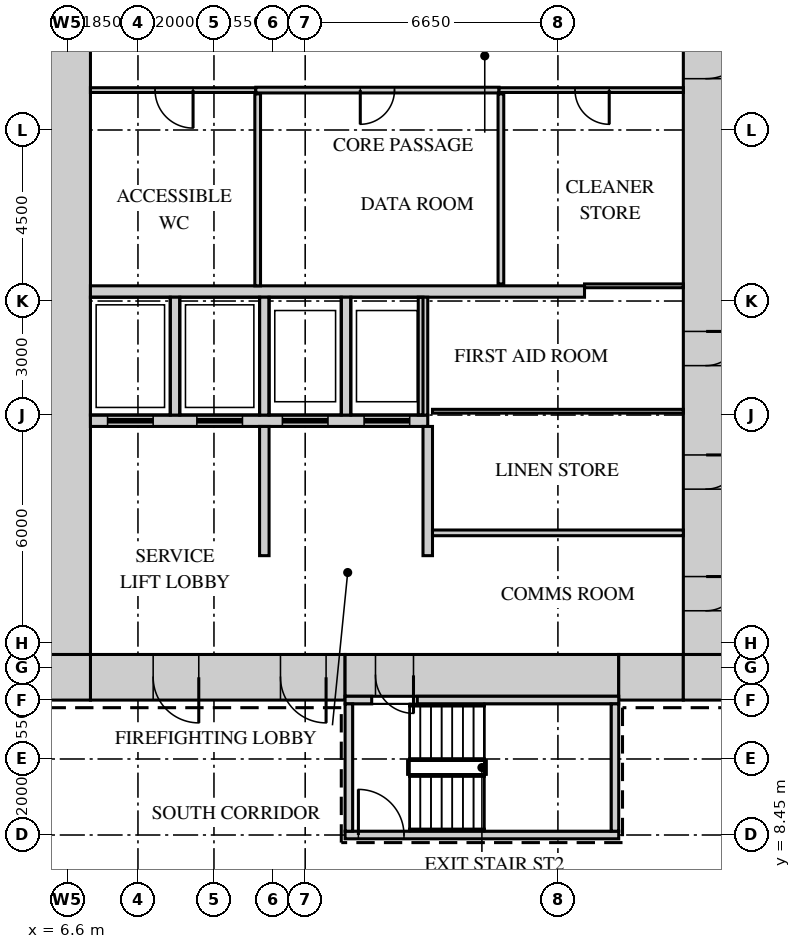
"""IFC4 building model, lengths in metres.
Left out: names, types, materials, properties, quantities, classifications, styles, units other than length and angle.
Written with IfcOpenShell. Run it as: python <this file> out.ifc"""

import sys

from ifc_helpers import new_model, si_unit, direction, frame, frame_2d, origin, place, context, subcontext, project, spatial, rectangle, extrude, source, transform, mapped, element, fill, save


model = new_model("IFC4")
c1 = context("Model", 3, precision=1e-05, world=origin(), true_north=direction((0.0, 1.0)))
c2 = subcontext(c1, "Body", "Model", "MODEL_VIEW")
j1 = project(units=[si_unit("LENGTHUNIT", "METRE"), si_unit("PLANEANGLEUNIT", "RADIAN")], contexts=[c1])
p1 = place(None, origin())
s1 = spatial("IfcSite", under=j1, at=p1, CompositionType="ELEMENT")
p2 = place(p1, origin())
s2 = spatial("IfcBuilding", under=s1, at=p2, CompositionType="ELEMENT")
p3 = place(p2, frame((0.0, 0.0, 7.5)))
s3 = spatial("IfcBuildingStorey", under=s2, at=p3, CompositionType="ELEMENT", Elevation=7.5)
m1 = source(origin(), c2, "Body", "SweptSolid", [
    extrude(rectangle(XDim=6.7, YDim=1.2, at=frame_2d((3.35, 0.0))), origin(), (0.0, 0.0, 1.0), 5.2),
])
p4 = place(p3, frame((7.2, 12.6, 0.0), z_axis=(0.0, 0.0, 1.0), x_axis=(1.0, 0.0, 0.0)))
e1 = element("IfcWall", 1, at=p4, inside=s3, PredefinedType="SHEAR", context=c2, shape_type="MappedRepresentation", body=[
    mapped(m1, transform((0.0, 0.0, 0.0))),
])
m2 = source(origin(), c2, "Body", "SweptSolid", [
    extrude(rectangle(XDim=1.2, YDim=2.1, at=frame_2d((0.6, 1.05))), frame((0.0, 0.61, 0.0), z_axis=(0.0, -1.0, 0.0), x_axis=(1.0, 0.0, 0.0)), (0.0, 0.0, 1.0), 1.22),
])
p5 = place(p4, frame((5.0, 0.0, 0.0)))
e2 = element("IfcOpeningElement", 2, at=p5, cuts=e1, PredefinedType="OPENING", context=c2, shape_type="MappedRepresentation", body=[
    mapped(m2, transform((0.0, 0.0, 0.0))),
])
p6 = place(p4, frame((1.65, 0.0, 0.0)))
e3 = element("IfcOpeningElement", 3, at=p6, cuts=e1, PredefinedType="OPENING", context=c2, shape_type="MappedRepresentation", body=[
    mapped(m2, transform((0.0, 0.0, 0.0))),
])
m3 = source(origin(), c2, "Body", "SweptSolid", [
    extrude(rectangle(XDim=7.2, YDim=1.1, at=frame_2d((3.6, 0.0))), origin(), (0.0, 0.0, 1.0), 5.2),
])
p7 = place(p3, frame((13.9, 12.65, 0.0), z_axis=(0.0, 0.0, 1.0), x_axis=(1.0, 0.0, 0.0)))
e4 = element("IfcWall", 4, at=p7, inside=s3, PredefinedType="SHEAR", context=c2, shape_type="MappedRepresentation", body=[
    mapped(m3, transform((0.0, 0.0, 0.0))),
])
m4 = source(origin(), c2, "Body", "SweptSolid", [
    extrude(rectangle(XDim=1.0, YDim=2.1, at=frame_2d((0.5, 1.05))), frame((0.0, 0.56, 0.0), z_axis=(0.0, -1.0, 0.0), x_axis=(1.0, 0.0, 0.0)), (0.0, 0.0, 1.0), 1.12),
])
p8 = place(p7, frame((0.8, 0.0, 0.0)))
e5 = element("IfcOpeningElement", 5, at=p8, cuts=e4, PredefinedType="OPENING", context=c2, shape_type="MappedRepresentation", body=[
    mapped(m4, transform((0.0, 0.0, 0.0))),
])
m5 = source(origin(), c2, "Body", "SweptSolid", [
    extrude(rectangle(XDim=1.7, YDim=1.2, at=frame_2d((0.85, 0.0))), origin(), (0.0, 0.0, 1.0), 5.2),
])
p9 = place(p3, frame((21.1, 12.6, 0.0), z_axis=(0.0, 0.0, 1.0), x_axis=(1.0, 0.0, 0.0)))
e6 = element("IfcWall", 6, at=p9, inside=s3, PredefinedType="SHEAR", context=c2, shape_type="MappedRepresentation", body=[
    mapped(m5, transform((0.0, 0.0, 0.0))),
])
m6 = source(origin(), c2, "Body", "SweptSolid", [
    extrude(rectangle(XDim=1.2, YDim=1.2, at=frame_2d((0.6, 0.0))), origin(), (0.0, 0.0, 1.0), 5.2),
])
for number, where, z_axis, x_axis in (
    (7, (22.8, 12.6, 0.0), (0.0, 0.0, 1.0), (1.0, 0.0, 0.0)),
    (8, (6.0, 12.6, 0.0), (0.0, 0.0, 1.0), (1.0, 0.0, 0.0)),
):
    element("IfcWall", number, at=place(p3, frame(where, z_axis=z_axis, x_axis=x_axis)), inside=s3, PredefinedType="SHEAR", context=c2, shape_type="MappedRepresentation", body=[
        mapped(m6, transform((0.0, 0.0, 0.0))),
    ])
m7 = source(origin(), c2, "Body", "SweptSolid", [
    extrude(rectangle(XDim=27.6, YDim=1.2, at=frame_2d((13.8, 0.0))), origin(), (0.0, 0.0, 1.0), 5.2),
])
p10 = place(p3, frame((23.4, 13.2, 0.0), z_axis=(0.0, 0.0, 1.0), x_axis=(0.0, 1.0, 0.0)))
e9 = element("IfcWall", 9, at=p10, inside=s3, PredefinedType="SHEAR", context=c2, shape_type="MappedRepresentation", body=[
    mapped(m7, transform((0.0, 0.0, 0.0))),
])
m8 = source(origin(), c2, "Body", "SweptSolid", [
    extrude(rectangle(XDim=1.8, YDim=2.1, at=frame_2d((0.9, 1.05))), frame((0.0, 0.61, 0.0), z_axis=(0.0, -1.0, 0.0), x_axis=(1.0, 0.0, 0.0)), (0.0, 0.0, 1.0), 1.22),
])
p11 = place(p10, frame((22.4, 0.0, 0.0)))
e10 = element("IfcOpeningElement", 10, at=p11, cuts=e9, PredefinedType="OPENING", context=c2, shape_type="MappedRepresentation", body=[
    mapped(m8, transform((0.0, 0.0, 0.0))),
])
p12 = place(p10, frame((15.15, 0.0, 0.0)))
e11 = element("IfcOpeningElement", 11, at=p12, cuts=e9, PredefinedType="OPENING", context=c2, shape_type="MappedRepresentation", body=[
    mapped(m2, transform((0.0, 0.0, 0.0))),
])
m9 = source(origin(), c2, "Body", "SweptSolid", [
    extrude(rectangle(XDim=0.9, YDim=2.1, at=frame_2d((0.45, 1.05))), frame((0.0, 0.61, 0.0), z_axis=(0.0, -1.0, 0.0), x_axis=(1.0, 0.0, 0.0)), (0.0, 0.0, 1.0), 1.22),
])
p13 = place(p10, frame((1.15, 0.0, 0.0)))
e12 = element("IfcOpeningElement", 12, at=p13, cuts=e9, PredefinedType="OPENING", context=c2, shape_type="MappedRepresentation", body=[
    mapped(m9, transform((0.0, 0.0, 0.0))),
])
p14 = place(p10, frame((4.35, 0.0, 0.0)))
e13 = element("IfcOpeningElement", 13, at=p14, cuts=e9, PredefinedType="OPENING", context=c2, shape_type="MappedRepresentation", body=[
    mapped(m9, transform((0.0, 0.0, 0.0))),
])
p15 = place(p10, frame((7.6, 0.0, 0.0)))
e14 = element("IfcOpeningElement", 14, at=p15, cuts=e9, PredefinedType="OPENING", context=c2, shape_type="MappedRepresentation", body=[
    mapped(m9, transform((0.0, 0.0, 0.0))),
])
p16 = place(p3, frame((6.6, 13.2, 0.0), z_axis=(0.0, 0.0, 1.0), x_axis=(0.0, 1.0, 0.0)))
e15 = element("IfcWall", 15, at=p16, inside=s3, PredefinedType="SHEAR", context=c2, shape_type="MappedRepresentation", body=[
    mapped(m7, transform((0.0, 0.0, 0.0))),
])
m10 = source(origin(), c2, "Body", "SweptSolid", [
    extrude(rectangle(XDim=0.7, YDim=0.2, at=frame_2d((0.35, 0.0))), origin(), (0.0, 0.0, 1.0), 5.2),
])
p17 = place(p3, frame((13.9, 12.0, 0.0), z_axis=(0.0, 0.0, 1.0), x_axis=(1.0, 0.0, 0.0)))
e16 = element("IfcWall", 16, at=p17, inside=s3, PredefinedType="SHEAR", context=c2, shape_type="MappedRepresentation", body=[
    mapped(m10, transform((0.0, 0.0, 0.0))),
])
m11 = source(origin(), c2, "Body", "SweptSolid", [
    extrude(rectangle(XDim=5.3, YDim=0.2, at=frame_2d((2.65, 0.0))), origin(), (0.0, 0.0, 1.0), 5.2),
])
p18 = place(p3, frame((15.8, 12.0, 0.0), z_axis=(0.0, 0.0, 1.0), x_axis=(1.0, 0.0, 0.0)))
e17 = element("IfcWall", 17, at=p18, inside=s3, PredefinedType="SHEAR", context=c2, shape_type="MappedRepresentation", body=[
    mapped(m11, transform((0.0, 0.0, 0.0))),
])
m12 = source(origin(), c2, "Body", "SweptSolid", [
    extrude(rectangle(XDim=7.2, YDim=0.2, at=frame_2d((3.6, 0.0))), origin(), (0.0, 0.0, 1.0), 5.2),
])
p19 = place(p3, frame((13.9, 8.45, 0.0), z_axis=(0.0, 0.0, 1.0), x_axis=(1.0, 0.0, 0.0)))
e18 = element("IfcWall", 18, at=p19, inside=s3, PredefinedType="SHEAR", context=c2, shape_type="MappedRepresentation", body=[
    mapped(m12, transform((0.0, 0.0, 0.0))),
])
m13 = source(origin(), c2, "Body", "SweptSolid", [
    extrude(rectangle(XDim=1.2, YDim=2.1, at=frame_2d((0.6, 1.05))), frame((0.0, 0.11, 0.0), z_axis=(0.0, -1.0, 0.0), x_axis=(1.0, 0.0, 0.0)), (0.0, 0.0, 1.0), 0.22),
])
p20 = place(p19, frame((0.35, 0.0, 0.0)))
e19 = element("IfcOpeningElement", 19, at=p20, cuts=e18, PredefinedType="OPENING", context=c2, shape_type="MappedRepresentation", body=[
    mapped(m13, transform((0.0, 0.0, 0.0))),
])
m14 = source(origin(), c2, "Body", "SweptSolid", [
    extrude(rectangle(XDim=3.35, YDim=0.2, at=frame_2d((1.675, 0.0))), origin(), (0.0, 0.0, 1.0), 5.2),
])
for number, where, z_axis, x_axis in (
    (20, (21.0, 8.55, 0.0), (0.0, 0.0, 1.0), (0.0, 1.0, 0.0)),
    (21, (14.0, 8.55, 0.0), (0.0, 0.0, 1.0), (0.0, 1.0, 0.0)),
):
    element("IfcWall", number, at=place(p3, frame(where, z_axis=z_axis, x_axis=x_axis)), inside=s3, PredefinedType="SHEAR", context=c2, shape_type="MappedRepresentation", body=[
        mapped(m14, transform((0.0, 0.0, 0.0))),
    ])
m15 = source(origin(), c2, "Body", "SweptSolid", [
    extrude(rectangle(XDim=13.0, YDim=0.3, at=frame_2d((6.5, 0.0))), origin(), (0.0, 0.0, 1.0), 5.2),
])
p21 = place(p3, frame((7.2, 22.75, 0.0), z_axis=(0.0, 0.0, 1.0), x_axis=(1.0, 0.0, 0.0)))
e22 = element("IfcWall", 22, at=p21, inside=s3, PredefinedType="STANDARD", context=c2, shape_type="MappedRepresentation", body=[
    mapped(m15, transform((0.0, 0.0, 0.0))),
])
m16 = source(origin(), c2, "Body", "SweptSolid", [
    extrude(rectangle(XDim=8.875, YDim=0.3, at=frame_2d((4.438, 0.0))), origin(), (0.0, 0.0, 1.0), 5.2),
])
p22 = place(p3, frame((7.2, 19.35, 0.0), z_axis=(0.0, 0.0, 1.0), x_axis=(1.0, 0.0, 0.0)))
e23 = element("IfcWall", 23, at=p22, inside=s3, PredefinedType="STANDARD", context=c2, shape_type="MappedRepresentation", body=[
    mapped(m16, transform((0.0, 0.0, 0.0))),
])
m17 = source(origin(), c2, "Body", "SweptSolid", [
    extrude(rectangle(XDim=1.2, YDim=2.1, at=frame_2d((0.6, 1.05))), frame((0.0, 0.16, 0.0), z_axis=(0.0, -1.0, 0.0), x_axis=(1.0, 0.0, 0.0)), (0.0, 0.0, 1.0), 0.32),
])
p23 = place(p22, frame((0.45, 0.0, 0.0)))
e24 = element("IfcOpeningElement", 24, at=p23, cuts=e23, PredefinedType="OPENING", context=c2, shape_type="MappedRepresentation", body=[
    mapped(m17, transform((0.0, 0.0, 0.0))),
])
p24 = place(p22, frame((2.8, 0.0, 0.0)))
e25 = element("IfcOpeningElement", 25, at=p24, cuts=e23, PredefinedType="OPENING", context=c2, shape_type="MappedRepresentation", body=[
    mapped(m17, transform((0.0, 0.0, 0.0))),
])
p25 = place(p22, frame((5.05, 0.0, 0.0)))
e26 = element("IfcOpeningElement", 26, at=p25, cuts=e23, PredefinedType="OPENING", context=c2, shape_type="MappedRepresentation", body=[
    mapped(m17, transform((0.0, 0.0, 0.0))),
])
p26 = place(p22, frame((7.2, 0.0, 0.0)))
e27 = element("IfcOpeningElement", 27, at=p26, cuts=e23, PredefinedType="OPENING", context=c2, shape_type="MappedRepresentation", body=[
    mapped(m17, transform((0.0, 0.0, 0.0))),
])
m18 = source(origin(), c2, "Body", "SweptSolid", [
    extrude(rectangle(XDim=3.1, YDim=0.25, at=frame_2d((1.55, 0.0))), origin(), (0.0, 0.0, 1.0), 5.2),
])
for number, where, z_axis, x_axis in (
    (28, (9.425, 19.5, 0.0), (0.0, 0.0, 1.0), (0.0, 1.0, 0.0)),
    (29, (11.775, 19.5, 0.0), (0.0, 0.0, 1.0), (0.0, 1.0, 0.0)),
    (30, (13.925, 19.5, 0.0), (0.0, 0.0, 1.0), (0.0, 1.0, 0.0)),
    (31, (15.95, 19.5, 0.0), (0.0, 0.0, 1.0), (0.0, 1.0, 0.0)),
):
    element("IfcWall", number, at=place(p3, frame(where, z_axis=z_axis, x_axis=x_axis)), inside=s3, PredefinedType="STANDARD", context=c2, shape_type="MappedRepresentation", body=[
        mapped(m18, transform((0.0, 0.0, 0.0))),
    ])
m19 = source(origin(), c2, "Body", "SweptSolid", [
    extrude(rectangle(XDim=3.4, YDim=0.25, at=frame_2d((1.7, 0.0))), origin(), (0.0, 0.0, 1.0), 5.2),
])
for number, where, z_axis, x_axis in (
    (32, (16.075, 15.8, 0.0), (0.0, 0.0, 1.0), (0.0, 1.0, 0.0)),
    (33, (11.775, 15.8, 0.0), (0.0, 0.0, 1.0), (0.0, 1.0, 0.0)),
):
    element("IfcWall", number, at=place(p3, frame(where, z_axis=z_axis, x_axis=x_axis)), inside=s3, PredefinedType="STANDARD", context=c2, shape_type="MappedRepresentation", body=[
        mapped(m19, transform((0.0, 0.0, 0.0))),
    ])
m20 = source(origin(), c2, "Body", "SweptSolid", [
    extrude(rectangle(XDim=6.6, YDim=0.15, at=frame_2d((3.3, 0.0))), origin(), (0.0, 0.0, 1.0), 5.2),
])
p27 = place(p3, frame((16.2, 16.4, 0.0), z_axis=(0.0, 0.0, 1.0), x_axis=(1.0, 0.0, 0.0)))
e34 = element("IfcWall", 34, at=p27, inside=s3, PredefinedType="PARTITIONING", context=c2, shape_type="MappedRepresentation", body=[
    mapped(m20, transform((0.0, 0.0, 0.0))),
])
m21 = source(origin(), c2, "Body", "SweptSolid", [
    extrude(rectangle(XDim=6.6, YDim=0.1, at=frame_2d((3.3, 0.0))), origin(), (0.0, 0.0, 1.0), 5.2),
])
p28 = place(p3, frame((16.2, 19.6, 0.0), z_axis=(0.0, 0.0, 1.0), x_axis=(1.0, 0.0, 0.0)))
e35 = element("IfcWall", 35, at=p28, inside=s3, PredefinedType="PARTITIONING", context=c2, shape_type="MappedRepresentation", body=[
    mapped(m21, transform((0.0, 0.0, 0.0))),
])
m22 = source(origin(), c2, "Body", "SweptSolid", [
    extrude(rectangle(XDim=5.05, YDim=0.15, at=frame_2d((2.525, 0.0))), origin(), (0.0, 0.0, 1.0), 5.2),
])
p29 = place(p3, frame((11.6, 22.9, 0.0), z_axis=(0.0, 0.0, 1.0), x_axis=(0.0, 1.0, 0.0)))
e36 = element("IfcWall", 36, at=p29, inside=s3, PredefinedType="PARTITIONING", context=c2, shape_type="MappedRepresentation", body=[
    mapped(m22, transform((0.0, 0.0, 0.0))),
])
m23 = source(origin(), c2, "Body", "SweptSolid", [
    extrude(rectangle(XDim=2.6, YDim=0.1, at=frame_2d((1.3, 0.0))), origin(), (0.0, 0.0, 1.0), 5.2),
])
p30 = place(p3, frame((20.2, 22.9, 0.0), z_axis=(0.0, 0.0, 1.0), x_axis=(1.0, 0.0, 0.0)))
e37 = element("IfcWall", 37, at=p30, inside=s3, PredefinedType="PARTITIONING", context=c2, shape_type="MappedRepresentation", body=[
    mapped(m23, transform((0.0, 0.0, 0.0))),
])
m24 = source(origin(), c2, "Body", "SweptSolid", [
    extrude(rectangle(XDim=5.0, YDim=0.15, at=frame_2d((2.5, 0.0))), origin(), (0.0, 0.0, 1.0), 5.2),
])
p31 = place(p3, frame((18.0, 22.95, 0.0), z_axis=(0.0, 0.0, 1.0), x_axis=(0.0, 1.0, 0.0)))
e38 = element("IfcWall", 38, at=p31, inside=s3, PredefinedType="PARTITIONING", context=c2, shape_type="MappedRepresentation", body=[
    mapped(m24, transform((0.0, 0.0, 0.0))),
])
m25 = source(origin(), c2, "Body", "SweptSolid", [
    extrude(rectangle(XDim=4.35, YDim=0.125, at=frame_2d((2.175, 0.0))), origin(), (0.0, 0.0, 1.0), 5.2),
])
p32 = place(p3, frame((7.2, 28.05, 0.0), z_axis=(0.0, 0.0, 1.0), x_axis=(1.0, 0.0, 0.0)))
e39 = element("IfcWall", 39, at=p32, inside=s3, PredefinedType="PARTITIONING", context=c2, shape_type="MappedRepresentation", body=[
    mapped(m25, transform((0.0, 0.0, 0.0))),
])
m26 = source(origin(), c2, "Body", "SweptSolid", [
    extrude(rectangle(XDim=1.0, YDim=2.1, at=frame_2d((0.5, 1.05))), frame((0.0, 0.073, 0.0), z_axis=(0.0, -1.0, 0.0), x_axis=(1.0, 0.0, 0.0)), (0.0, 0.0, 1.0), 0.145),
])
p33 = place(p32, frame((1.7, 0.0, 0.0)))
e40 = element("IfcOpeningElement", 40, at=p33, cuts=e39, PredefinedType="OPENING", context=c2, shape_type="MappedRepresentation", body=[
    mapped(m26, transform((0.0, 0.0, 0.0))),
])
m27 = source(origin(), c2, "Body", "SweptSolid", [
    extrude(rectangle(XDim=6.4, YDim=0.15, at=frame_2d((3.2, 0.0))), origin(), (0.0, 0.0, 1.0), 5.2),
])
p34 = place(p3, frame((11.55, 28.05, 0.0), z_axis=(0.0, 0.0, 1.0), x_axis=(1.0, 0.0, 0.0)))
e41 = element("IfcWall", 41, at=p34, inside=s3, PredefinedType="PARTITIONING", context=c2, shape_type="MappedRepresentation", body=[
    mapped(m27, transform((0.0, 0.0, 0.0))),
])
m28 = source(origin(), c2, "Body", "SweptSolid", [
    extrude(rectangle(XDim=0.9, YDim=2.1, at=frame_2d((0.45, 1.05))), frame((0.0, 0.085, 0.0), z_axis=(0.0, -1.0, 0.0), x_axis=(1.0, 0.0, 0.0)), (0.0, 0.0, 1.0), 0.17),
])
p35 = place(p34, frame((2.75, 0.0, 0.0)))
e42 = element("IfcOpeningElement", 42, at=p35, cuts=e41, PredefinedType="OPENING", context=c2, shape_type="MappedRepresentation", body=[
    mapped(m28, transform((0.0, 0.0, 0.0))),
])
m29 = source(origin(), c2, "Body", "SweptSolid", [
    extrude(rectangle(XDim=4.85, YDim=0.125, at=frame_2d((2.425, 0.0))), origin(), (0.0, 0.0, 1.0), 5.2),
])
p36 = place(p3, frame((17.95, 28.05, 0.0), z_axis=(0.0, 0.0, 1.0), x_axis=(1.0, 0.0, 0.0)))
e43 = element("IfcWall", 43, at=p36, inside=s3, PredefinedType="PARTITIONING", context=c2, shape_type="MappedRepresentation", body=[
    mapped(m29, transform((0.0, 0.0, 0.0))),
])
m30 = source(origin(), c2, "Body", "SweptSolid", [
    extrude(rectangle(XDim=0.9, YDim=2.1, at=frame_2d((0.45, 1.05))), frame((0.0, 0.073, 0.0), z_axis=(0.0, -1.0, 0.0), x_axis=(1.0, 0.0, 0.0)), (0.0, 0.0, 1.0), 0.145),
])
p37 = place(p36, frame((2.0, 0.0, 0.0)))
e44 = element("IfcOpeningElement", 44, at=p37, cuts=e43, PredefinedType="OPENING", context=c2, shape_type="MappedRepresentation", body=[
    mapped(m30, transform((0.0, 0.0, 0.0))),
])
m31 = source(origin(), c2, "Body", "SweptSolid", [
    extrude(rectangle(XDim=1.2, YDim=2.1, at=frame_2d((0.6, 1.05))), frame((0.0, 0.55, 0.0), z_axis=(0.0, -1.0, 0.0), x_axis=(1.0, 0.0, 0.0)), (0.0, 0.0, 1.0), 1.1),
])
p38 = place(p12, origin())
e45 = element("IfcDoor", 45, at=p38, inside=s3, OperationType="SINGLE_SWING_RIGHT", PredefinedType="DOOR", context=c2, shape_type="MappedRepresentation", body=[
    mapped(m31, transform((0.0, 0.0, 0.0))),
])
fill(e11, e45)
m32 = source(origin(), c2, "Body", "SweptSolid", [
    extrude(rectangle(XDim=1.0, YDim=2.1, at=frame_2d((0.5, 1.05))), frame((0.0, 0.025, 0.0), z_axis=(0.0, -1.0, 0.0), x_axis=(1.0, 0.0, 0.0)), (0.0, 0.0, 1.0), 0.05),
])
p39 = place(p33, origin())
e46 = element("IfcDoor", 46, at=p39, inside=s3, OperationType="SINGLE_SWING_RIGHT", PredefinedType="DOOR", context=c2, shape_type="MappedRepresentation", body=[
    mapped(m32, transform((0.0, 0.0, 0.0))),
])
fill(e40, e46)
m33 = source(origin(), c2, "Body", "SweptSolid", [
    extrude(rectangle(XDim=0.9, YDim=2.1, at=frame_2d((0.45, 1.05))), frame((0.0, 0.025, 0.0), z_axis=(0.0, -1.0, 0.0), x_axis=(1.0, 0.0, 0.0)), (0.0, 0.0, 1.0), 0.05),
])
p40 = place(p35, origin())
e47 = element("IfcDoor", 47, at=p40, inside=s3, OperationType="SINGLE_SWING_LEFT", PredefinedType="DOOR", context=c2, shape_type="MappedRepresentation", body=[
    mapped(m33, transform((0.0, 0.0, 0.0))),
])
fill(e42, e47)
p41 = place(p37, origin())
e48 = element("IfcDoor", 48, at=p41, inside=s3, OperationType="SINGLE_SWING_RIGHT", PredefinedType="DOOR", context=c2, shape_type="MappedRepresentation", body=[
    mapped(m33, transform((0.0, 0.0, 0.0))),
])
fill(e44, e48)
m34 = source(origin(), c2, "Body", "SweptSolid", [
    extrude(rectangle(XDim=0.9, YDim=2.1, at=frame_2d((0.45, 1.05))), frame((0.0, 0.55, 0.0), z_axis=(0.0, -1.0, 0.0), x_axis=(1.0, 0.0, 0.0)), (0.0, 0.0, 1.0), 1.1),
])
p42 = place(p13, origin())
e49 = element("IfcDoor", 49, at=p42, inside=s3, OperationType="SINGLE_SWING_RIGHT", PredefinedType="DOOR", context=c2, shape_type="MappedRepresentation", body=[
    mapped(m34, transform((0.0, 0.0, 0.0))),
])
fill(e12, e49)
p43 = place(p14, origin())
e50 = element("IfcDoor", 50, at=p43, inside=s3, OperationType="SINGLE_SWING_RIGHT", PredefinedType="DOOR", context=c2, shape_type="MappedRepresentation", body=[
    mapped(m34, transform((0.0, 0.0, 0.0))),
])
fill(e13, e50)
p44 = place(p15, origin())
e51 = element("IfcDoor", 51, at=p44, inside=s3, OperationType="SINGLE_SWING_RIGHT", PredefinedType="DOOR", context=c2, shape_type="MappedRepresentation", body=[
    mapped(m34, transform((0.0, 0.0, 0.0))),
])
fill(e14, e51)
p45 = place(p5, origin())
e52 = element("IfcDoor", 52, at=p45, inside=s3, OperationType="SINGLE_SWING_RIGHT", PredefinedType="DOOR", context=c2, shape_type="MappedRepresentation", body=[
    mapped(m31, transform((0.0, 0.0, 0.0))),
])
fill(e2, e52)
p46 = place(p6, origin())
e53 = element("IfcDoor", 53, at=p46, inside=s3, OperationType="SINGLE_SWING_RIGHT", PredefinedType="DOOR", context=c2, shape_type="MappedRepresentation", body=[
    mapped(m31, transform((0.0, 0.0, 0.0))),
])
fill(e3, e53)
m35 = source(origin(), c2, "Body", "SweptSolid", [
    extrude(rectangle(XDim=1.0, YDim=2.1, at=frame_2d((0.5, 1.05))), frame((0.0, 0.5, 0.0), z_axis=(0.0, -1.0, 0.0), x_axis=(1.0, 0.0, 0.0)), (0.0, 0.0, 1.0), 1.0),
])
p47 = place(p8, origin())
e54 = element("IfcDoor", 54, at=p47, inside=s3, OperationType="SINGLE_SWING_RIGHT", PredefinedType="DOOR", context=c2, shape_type="MappedRepresentation", body=[
    mapped(m35, transform((0.0, 0.0, 0.0))),
])
fill(e5, e54)
m36 = source(origin(), c2, "Body", "SweptSolid", [
    extrude(rectangle(XDim=1.2, YDim=2.1, at=frame_2d((0.6, 1.05))), frame((0.0, 0.025, 0.0), z_axis=(0.0, -1.0, 0.0), x_axis=(1.0, 0.0, 0.0)), (0.0, 0.0, 1.0), 0.05),
])
p48 = place(p20, origin())
e55 = element("IfcDoor", 55, at=p48, inside=s3, OperationType="SINGLE_SWING_RIGHT", PredefinedType="DOOR", context=c2, shape_type="MappedRepresentation", body=[
    mapped(m36, transform((0.0, 0.0, 0.0))),
])
fill(e19, e55)
p49 = place(p23, origin())
e56 = element("IfcDoor", 56, at=p49, inside=s3, OperationType="DOUBLE_DOOR_SLIDING", PredefinedType="DOOR", context=c2, shape_type="MappedRepresentation", body=[
    mapped(m36, transform((0.0, 0.0, 0.0))),
])
fill(e24, e56)
p50 = place(p24, origin())
e57 = element("IfcDoor", 57, at=p50, inside=s3, OperationType="DOUBLE_DOOR_SLIDING", PredefinedType="DOOR", context=c2, shape_type="MappedRepresentation", body=[
    mapped(m36, transform((0.0, 0.0, 0.0))),
])
fill(e25, e57)
p51 = place(p25, origin())
e58 = element("IfcDoor", 58, at=p51, inside=s3, OperationType="DOUBLE_DOOR_SLIDING", PredefinedType="DOOR", context=c2, shape_type="MappedRepresentation", body=[
    mapped(m36, transform((0.0, 0.0, 0.0))),
])
fill(e26, e58)
p52 = place(p26, origin())
e59 = element("IfcDoor", 59, at=p52, inside=s3, OperationType="DOUBLE_DOOR_SLIDING", PredefinedType="DOOR", context=c2, shape_type="MappedRepresentation", body=[
    mapped(m36, transform((0.0, 0.0, 0.0))),
])
fill(e27, e59)
save(model, sys.argv[1])
